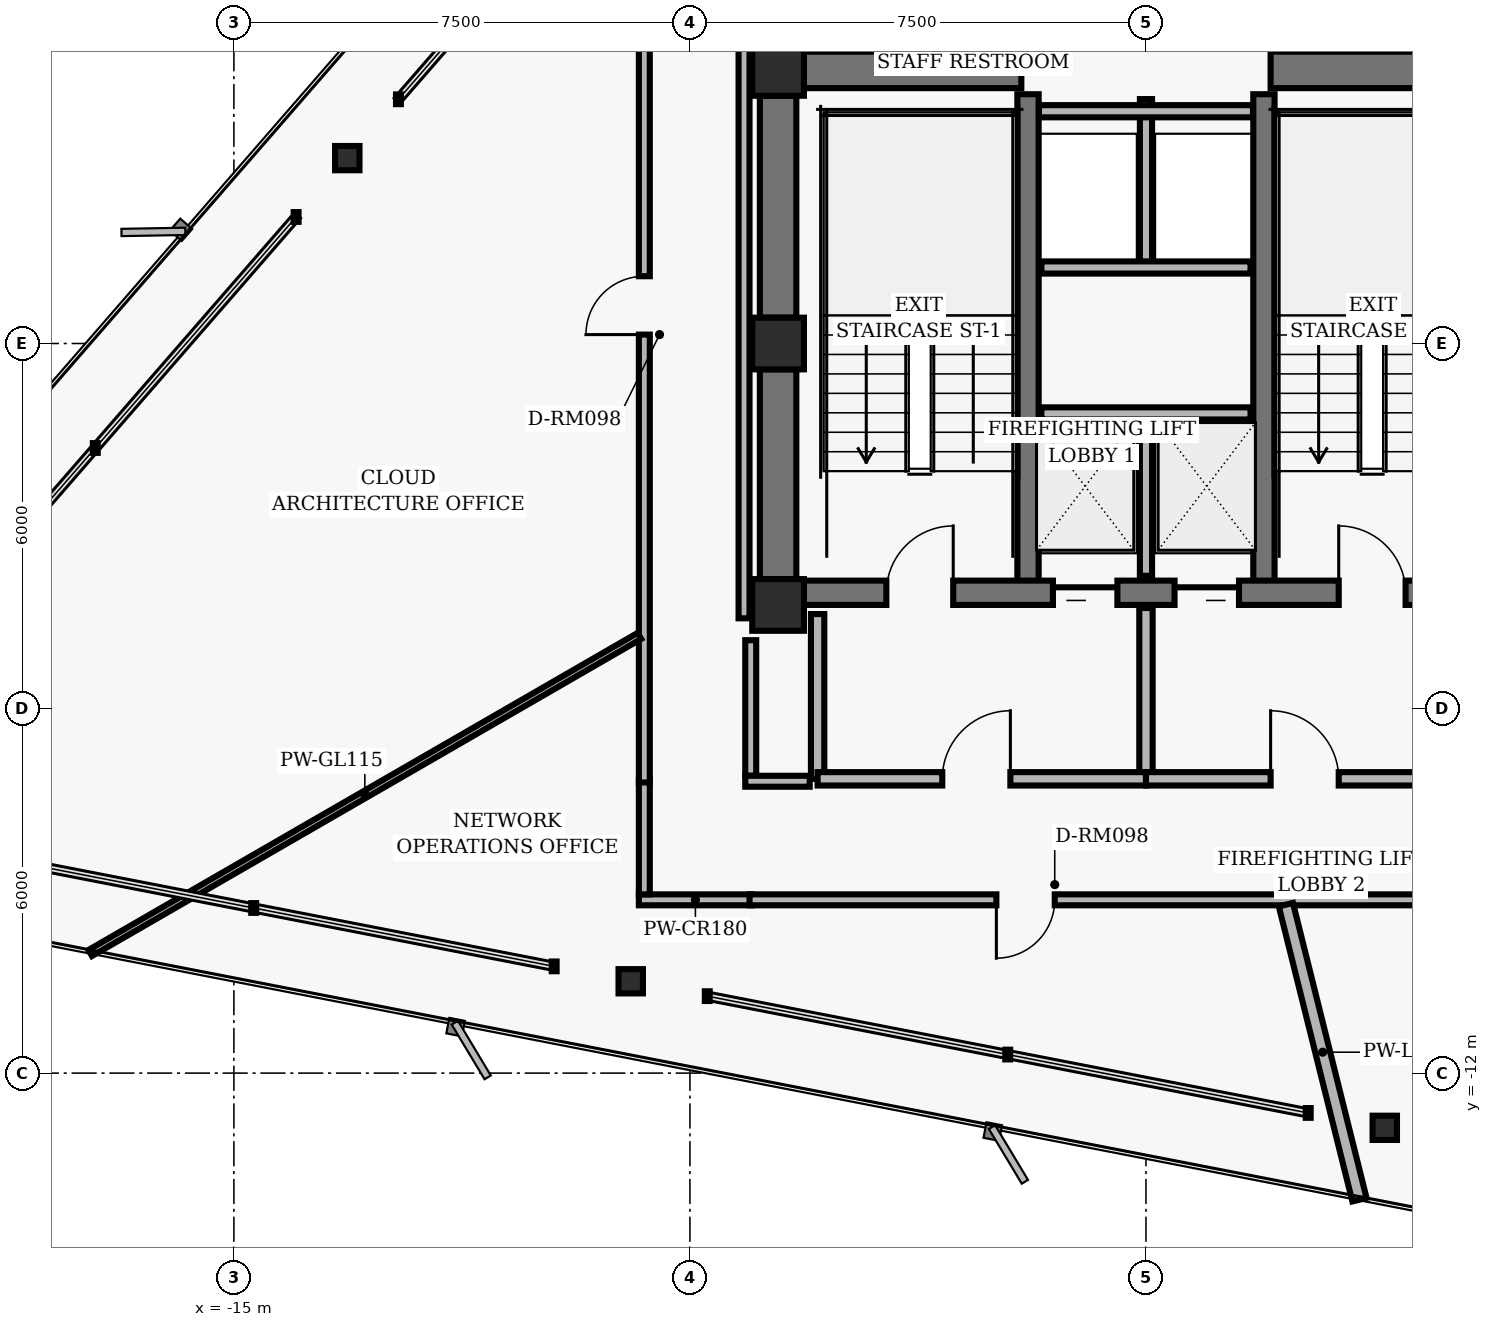
"""IFC4 building model, lengths in metres.
Left out: names, types, materials, properties, quantities, classifications, styles, units other than length and angle.
Written with IfcOpenShell. Run it as: python <this file> out.ifc"""

import sys

from ifc_helpers import new_model, si_unit, direction, frame, frame_2d, origin, origin_2d, place, context, subcontext, project, spatial, rectangle, hollow_rectangle, i_section, extrude, element, fill, save


model = new_model("IFC4")
c1 = context("Model", 3, precision=1e-05, world=origin(), true_north=direction((0.0, 1.0)))
c2 = subcontext(c1, "Body", "Model", "MODEL_VIEW")
j1 = project(units=[si_unit("LENGTHUNIT", "METRE"), si_unit("PLANEANGLEUNIT", "RADIAN")], contexts=[c1])
p1 = place(None, origin())
s1 = spatial("IfcSite", under=j1, at=p1, CompositionType="ELEMENT")
p2 = place(p1, origin())
s2 = spatial("IfcBuilding", under=s1, at=p2, CompositionType="ELEMENT")
p3 = place(p2, frame((0.0, 0.0, 150.24)))
s3 = spatial("IfcBuildingStorey", under=s2, at=p3, CompositionType="ELEMENT", Elevation=150.24)
for number, where, z_axis, x_axis in (
    (1, (-6.05, 4.5, 0.0), (0.0, 0.0, 1.0), (1.0, 0.0, 0.0)),
    (2, (-6.05, 0.0, 0.0), (0.0, 0.0, 1.0), (1.0, 0.0, 0.0)),
    (3, (-6.05, -4.3, 0.0), (0.0, 0.0, 1.0), (1.0, 0.0, 0.0)),
):
    element("IfcColumn", number, at=place(p3, frame(where, z_axis=z_axis, x_axis=x_axis)), inside=s3, PredefinedType="COLUMN", context=c2, shape_type="SweptSolid", body=[
        extrude(hollow_rectangle(XDim=0.85, YDim=0.85, WallThickness=0.055, InnerFilletRadius=0.02, OuterFilletRadius=0.04, at=origin_2d()), origin(), (0.0, 0.0, 1.0), 3.04),
    ])
p4 = place(p3, frame((-6.05, 0.425, 0.0), z_axis=(0.0, 0.0, 1.0), x_axis=(0.0, 1.0, 0.0)))
e4 = element("IfcWall", 4, at=p4, inside=s3, PredefinedType="SHEAR", context=c2, shape_type="SweptSolid", body=[
    extrude(rectangle(XDim=3.65, YDim=0.6, at=frame_2d((1.825, 0.0))), origin(), (0.0, 0.0, 1.0), 2.788),
])
p5 = place(p3, frame((-6.05, -3.875, 0.0), z_axis=(0.0, 0.0, 1.0), x_axis=(0.0, 1.0, 0.0)))
e5 = element("IfcWall", 5, at=p5, inside=s3, PredefinedType="SHEAR", context=c2, shape_type="SweptSolid", body=[
    extrude(rectangle(XDim=3.45, YDim=0.6, at=frame_2d((1.725, 0.0))), origin(), (0.0, 0.0, 1.0), 2.788),
])
for number, where, z_axis, x_axis in (
    (6, (-1.94, -4.1, 0.0), (0.0, 0.0, 1.0), (0.0, 1.0, 0.0)),
    (7, (1.94, -4.1, 0.0), (0.0, 0.0, 1.0), (0.0, 1.0, 0.0)),
):
    element("IfcWall", number, at=place(p3, frame(where, z_axis=z_axis, x_axis=x_axis)), inside=s3, PredefinedType="SHEAR", context=c2, shape_type="SweptSolid", body=[
        extrude(rectangle(XDim=8.2, YDim=0.35, at=frame_2d((4.1, 0.0))), origin(), (0.0, 0.0, 1.0), 2.788),
    ])
p6 = place(p3, frame((-5.625, -4.1, 0.0), z_axis=(0.0, 0.0, 1.0), x_axis=(1.0, 0.0, 0.0)))
e8 = element("IfcWall", 8, at=p6, inside=s3, PredefinedType="SHEAR", context=c2, shape_type="SweptSolid", body=[
    extrude(rectangle(XDim=11.25, YDim=0.4, at=frame_2d((5.625, 0.0))), origin(), (0.0, 0.0, 1.0), 2.788),
])
p7 = place(p6, frame((1.355, 0.0, 0.0)))
e9 = element("IfcOpeningElement", 9, at=p7, cuts=e8, PredefinedType="OPENING", context=c2, shape_type="SweptSolid", body=[
    extrude(rectangle(XDim=1.1, YDim=2.04, at=frame_2d((0.55, 1.02))), frame((0.0, 0.21, 0.0), z_axis=(0.0, -1.0, 0.0), x_axis=(1.0, 0.0, 0.0)), (0.0, 0.0, 1.0), 0.42),
])
p8 = place(p6, frame((8.795, 0.0, 0.0)))
e10 = element("IfcOpeningElement", 10, at=p8, cuts=e8, PredefinedType="OPENING", context=c2, shape_type="SweptSolid", body=[
    extrude(rectangle(XDim=1.1, YDim=2.04, at=frame_2d((0.55, 1.02))), frame((0.0, 0.21, 0.0), z_axis=(0.0, -1.0, 0.0), x_axis=(1.0, 0.0, 0.0)), (0.0, 0.0, 1.0), 0.42),
])
p9 = place(p6, frame((4.095, 0.0, 0.0)))
e11 = element("IfcOpeningElement", 11, at=p9, cuts=e8, PredefinedType="OPENING", context=c2, shape_type="SweptSolid", body=[
    extrude(rectangle(XDim=1.06, YDim=2.04, at=frame_2d((0.53, 1.02))), frame((0.0, 0.21, 0.0), z_axis=(0.0, -1.0, 0.0), x_axis=(1.0, 0.0, 0.0)), (0.0, 0.0, 1.0), 0.42),
])
p10 = place(p6, frame((6.095, 0.0, 0.0)))
e12 = element("IfcOpeningElement", 12, at=p10, cuts=e8, PredefinedType="OPENING", context=c2, shape_type="SweptSolid", body=[
    extrude(rectangle(XDim=1.06, YDim=2.04, at=frame_2d((0.53, 1.02))), frame((0.0, 0.21, 0.0), z_axis=(0.0, -1.0, 0.0), x_axis=(1.0, 0.0, 0.0)), (0.0, 0.0, 1.0), 0.42),
])
for number, where, z_axis, x_axis in (
    (13, (-5.625, 4.5, 0.0), (0.0, 0.0, 1.0), (1.0, 0.0, 0.0)),
    (14, (2.05, 4.5, 0.0), (0.0, 0.0, 1.0), (1.0, 0.0, 0.0)),
):
    element("IfcWall", number, at=place(p3, frame(where, z_axis=z_axis, x_axis=x_axis)), inside=s3, PredefinedType="SHEAR", context=c2, shape_type="SweptSolid", body=[
        extrude(rectangle(XDim=3.575, YDim=0.6, at=frame_2d((1.788, 0.0))), origin(), (0.0, 0.0, 1.0), 2.788),
    ])
for number, where, z_axis, x_axis in (
    (15, (-13.135, 3.049, 0.0), (0.0, 0.0, 1.0), (1.0, 0.0, 0.0)),
    (16, (-8.474, -10.49, 0.0), (0.0, 0.0, 1.0), (1.0, 0.0, 0.0)),
    (17, (3.927, -12.9, 0.0), (0.0, 0.0, 1.0), (1.0, 0.0, 0.0)),
):
    element("IfcColumn", number, at=place(p3, frame(where, z_axis=z_axis, x_axis=x_axis)), inside=s3, PredefinedType="COLUMN", context=c2, shape_type="SweptSolid", body=[
        extrude(i_section(OverallWidth=0.401, OverallDepth=0.399, WebThickness=0.025, FlangeThickness=0.04, FilletRadius=0.018, at=origin_2d()), origin(), (0.0, 0.0, 1.0), 3.04),
    ])
p11 = place(p3, frame((0.0, -3.82, 0.0), z_axis=(0.0, 0.0, 1.0), x_axis=(0.0, 1.0, 0.0)))
e18 = element("IfcWall", 18, at=p11, inside=s3, PredefinedType="PARTITIONING", context=c2, shape_type="SweptSolid", body=[
    extrude(rectangle(XDim=2.67, YDim=0.2, at=frame_2d((1.335, 0.0))), origin(), (0.0, 0.0, 1.0), 2.763),
])
p12 = place(p3, frame((-1.72, -1.15, 0.0), z_axis=(0.0, 0.0, 1.0), x_axis=(1.0, 0.0, 0.0)))
e19 = element("IfcWall", 19, at=p12, inside=s3, PredefinedType="PARTITIONING", context=c2, shape_type="SweptSolid", body=[
    extrude(rectangle(XDim=3.44, YDim=0.2, at=frame_2d((1.72, 0.0))), origin(), (0.0, 0.0, 1.0), 2.763),
])
p13 = place(p3, frame((-5.4, -7.16, 0.0), z_axis=(0.0, 0.0, 1.0), x_axis=(0.0, 1.0, 0.0)))
e20 = element("IfcWall", 20, at=p13, inside=s3, PredefinedType="PARTITIONING", context=c2, shape_type="SweptSolid", body=[
    extrude(rectangle(XDim=2.71, YDim=0.22, at=frame_2d((1.355, 0.0))), origin(), (0.0, 0.0, 1.0), 2.763),
])
p14 = place(p3, frame((0.0, -7.16, 0.0), z_axis=(0.0, 0.0, 1.0), x_axis=(0.0, 1.0, 0.0)))
e21 = element("IfcWall", 21, at=p14, inside=s3, PredefinedType="PARTITIONING", context=c2, shape_type="SweptSolid", body=[
    extrude(rectangle(XDim=2.81, YDim=0.22, at=frame_2d((1.405, 0.0))), origin(), (0.0, 0.0, 1.0), 2.763),
])
p15 = place(p3, frame((-5.4, -7.16, 0.0), z_axis=(0.0, 0.0, 1.0), x_axis=(1.0, 0.0, 0.0)))
e22 = element("IfcWall", 22, at=p15, inside=s3, PredefinedType="PARTITIONING", context=c2, shape_type="SweptSolid", body=[
    extrude(rectangle(XDim=5.4, YDim=0.22, at=frame_2d((2.7, 0.0))), origin(), (0.0, 0.0, 1.0), 2.33),
])
p16 = place(p15, frame((2.05, 0.0, 0.0)))
e23 = element("IfcOpeningElement", 23, at=p16, cuts=e22, PredefinedType="OPENING", context=c2, shape_type="SweptSolid", body=[
    extrude(rectangle(XDim=1.12, YDim=2.02, at=frame_2d((0.56, 1.01))), frame((0.0, 0.12, 0.0), z_axis=(0.0, -1.0, 0.0), x_axis=(1.0, 0.0, 0.0)), (0.0, 0.0, 1.0), 0.24),
])
p17 = place(p3, frame((0.0, -7.16, 0.0), z_axis=(0.0, 0.0, 1.0), x_axis=(1.0, 0.0, 0.0)))
e24 = element("IfcWall", 24, at=p17, inside=s3, PredefinedType="PARTITIONING", context=c2, shape_type="SweptSolid", body=[
    extrude(rectangle(XDim=5.4, YDim=0.22, at=frame_2d((2.7, 0.0))), origin(), (0.0, 0.0, 1.0), 2.33),
])
p18 = place(p17, frame((2.05, 0.0, 0.0)))
e25 = element("IfcOpeningElement", 25, at=p18, cuts=e24, PredefinedType="OPENING", context=c2, shape_type="SweptSolid", body=[
    extrude(rectangle(XDim=1.12, YDim=2.02, at=frame_2d((0.56, 1.01))), frame((0.0, 0.12, 0.0), z_axis=(0.0, -1.0, 0.0), x_axis=(1.0, 0.0, 0.0)), (0.0, 0.0, 1.0), 0.24),
])
p19 = place(p3, frame((0.0, 1.25, 0.0), z_axis=(0.0, 0.0, 1.0), x_axis=(0.0, 1.0, 0.0)))
e26 = element("IfcWall", 26, at=p19, inside=s3, PredefinedType="PARTITIONING", context=c2, shape_type="SweptSolid", body=[
    extrude(rectangle(XDim=2.77, YDim=0.2, at=frame_2d((1.385, 0.0))), origin(), (0.0, 0.0, 1.0), 2.763),
])
p20 = place(p3, frame((-1.72, 1.25, 0.0), z_axis=(0.0, 0.0, 1.0), x_axis=(1.0, 0.0, 0.0)))
e27 = element("IfcWall", 27, at=p20, inside=s3, PredefinedType="PARTITIONING", context=c2, shape_type="SweptSolid", body=[
    extrude(rectangle(XDim=3.44, YDim=0.2, at=frame_2d((1.72, 0.0))), origin(), (0.0, 0.0, 1.0), 2.763),
])
p21 = place(p3, frame((-1.76, 3.82, 0.0), z_axis=(0.0, 0.0, 1.0), x_axis=(1.0, 0.0, 0.0)))
e28 = element("IfcWall", 28, at=p21, inside=s3, PredefinedType="PARTITIONING", context=c2, shape_type="SweptSolid", body=[
    extrude(rectangle(XDim=3.52, YDim=0.2, at=frame_2d((1.76, 0.0))), origin(), (0.0, 0.0, 1.0), 2.763),
])
p22 = place(p3, frame((-6.48, -9.15, 0.0), z_axis=(0.0, 0.0, 1.0), x_axis=(-1.0, 0.0, 0.0)))
e29 = element("IfcWall", 29, at=p22, inside=s3, PredefinedType="PARTITIONING", context=c2, shape_type="SweptSolid", body=[
    extrude(rectangle(XDim=1.86, YDim=0.18, at=frame_2d((0.93, 0.0))), origin(), (0.0, 0.0, 1.0), 2.33),
])
p23 = place(p3, frame((-8.25, -9.06, 0.0), z_axis=(0.0, 0.0, 1.0), x_axis=(0.0, 1.0, 0.0)))
e30 = element("IfcWall", 30, at=p23, inside=s3, PredefinedType="PARTITIONING", context=c2, shape_type="SweptSolid", body=[
    extrude(rectangle(XDim=1.88, YDim=0.18, at=frame_2d((0.94, 0.0))), origin(), (0.0, 0.0, 1.0), 2.763),
])
p24 = place(p3, frame((-8.25, -7.22, 0.0), z_axis=(0.0, 0.0, 1.0), x_axis=(0.0, 1.0, 0.0)))
e31 = element("IfcWall", 31, at=p24, inside=s3, PredefinedType="PARTITIONING", context=c2, shape_type="SweptSolid", body=[
    extrude(rectangle(XDim=14.44, YDim=0.18, at=frame_2d((7.22, 0.0))), origin(), (0.0, 0.0, 1.0), 2.763),
])
p25 = place(p24, frame((7.366, 0.0, 0.0)))
e32 = element("IfcOpeningElement", 32, at=p25, cuts=e31, PredefinedType="OPENING", context=c2, shape_type="SweptSolid", body=[
    extrude(rectangle(XDim=0.96, YDim=2.02, at=frame_2d((0.48, 1.01))), frame((0.0, 0.1, 0.0), z_axis=(0.0, -1.0, 0.0), x_axis=(1.0, 0.0, 0.0)), (0.0, 0.0, 1.0), 0.2),
])
p26 = place(p3, frame((-6.61, 4.94, 0.0), z_axis=(0.0, 0.0, 1.0), x_axis=(0.0, -1.0, 0.0)))
e33 = element("IfcWall", 33, at=p26, inside=s3, PredefinedType="PARTITIONING", context=c2, shape_type="SweptSolid", body=[
    extrude(rectangle(XDim=9.46, YDim=0.18, at=frame_2d((4.73, 0.0))), origin(), (0.0, 0.0, 1.0), 2.763),
])
p27 = place(p3, frame((-6.5, -4.88, 0.0), z_axis=(0.0, 0.0, 1.0), x_axis=(0.0, -1.0, 0.0)))
e34 = element("IfcWall", 34, at=p27, inside=s3, PredefinedType="PARTITIONING", context=c2, shape_type="SweptSolid", body=[
    extrude(rectangle(XDim=2.23, YDim=0.18, at=frame_2d((1.115, 0.0))), origin(), (0.0, 0.0, 1.0), 2.763),
])
p28 = place(p3, frame((-6.59, -7.2, 0.0), z_axis=(0.0, 0.0, 1.0), x_axis=(1.0, 0.0, 0.0)))
e35 = element("IfcWall", 35, at=p28, inside=s3, PredefinedType="PARTITIONING", context=c2, shape_type="SweptSolid", body=[
    extrude(rectangle(XDim=1.06, YDim=0.18, at=frame_2d((0.53, 0.0))), origin(), (0.0, 0.0, 1.0), 2.763),
])
p29 = place(p3, frame((10.98, -9.15, 0.0), z_axis=(0.0, 0.0, 1.0), x_axis=(-1.0, 0.0, 0.0)))
e36 = element("IfcWall", 36, at=p29, inside=s3, PredefinedType="PARTITIONING", context=c2, shape_type="SweptSolid", body=[
    extrude(rectangle(XDim=17.5, YDim=0.18, at=frame_2d((8.75, 0.0))), origin(), (0.0, 0.0, 1.0), 2.33),
])
p30 = place(p29, frame((12.48, 0.0, 0.0)))
e37 = element("IfcOpeningElement", 37, at=p30, cuts=e36, PredefinedType="OPENING", context=c2, shape_type="SweptSolid", body=[
    extrude(rectangle(XDim=0.96, YDim=2.02, at=frame_2d((0.48, 1.01))), frame((0.0, 0.1, 0.0), z_axis=(0.0, -1.0, 0.0), x_axis=(1.0, 0.0, 0.0)), (0.0, 0.0, 1.0), 0.2),
])
p31 = place(p29, frame((3.988, 0.0, 0.0)))
e38 = element("IfcOpeningElement", 38, at=p31, cuts=e36, PredefinedType="OPENING", context=c2, shape_type="SweptSolid", body=[
    extrude(rectangle(XDim=0.96, YDim=2.02, at=frame_2d((0.48, 1.01))), frame((0.0, 0.1, 0.0), z_axis=(0.0, -1.0, 0.0), x_axis=(1.0, 0.0, 0.0)), (0.0, 0.0, 1.0), 0.2),
])
p32 = place(p3, frame((-8.33, -4.809, 0.0), z_axis=(0.0, 0.0, 1.0), x_axis=(-0.866024997974, -0.500000702884, 0.0)))
e39 = element("IfcWall", 39, at=p32, inside=s3, PredefinedType="MOVABLE", context=c2, shape_type="SweptSolid", body=[
    extrude(rectangle(XDim=10.431, YDim=0.115, at=frame_2d((5.215, 0.0))), origin(), (0.0, 0.0, 1.0), 2.132),
])
p33 = place(p3, frame((2.301, -9.23, 0.0), z_axis=(0.0, 0.0, 1.0), x_axis=(0.241903783585, -0.970300241929, 0.0)))
e40 = element("IfcWall", 40, at=p33, inside=s3, PredefinedType="PARTITIONING", context=c2, shape_type="SweptSolid", body=[
    extrude(rectangle(XDim=5.001, YDim=0.24, at=frame_2d((2.5, 0.0))), origin(), (0.0, 0.0, 1.0), 2.763),
])
p34 = place(p7, origin())
e41 = element("IfcDoor", 41, at=p34, inside=s3, OperationType="SINGLE_SWING_RIGHT", PredefinedType="DOOR", context=c2, shape_type="SweptSolid", body=[
    extrude(rectangle(XDim=1.1, YDim=2.04, at=frame_2d((0.55, 1.02))), frame((0.0, 0.025, 0.0), z_axis=(0.0, -1.0, 0.0), x_axis=(1.0, 0.0, 0.0)), (0.0, 0.0, 1.0), 0.05),
])
fill(e9, e41)
p35 = place(p8, origin())
e42 = element("IfcDoor", 42, at=p35, inside=s3, OperationType="SINGLE_SWING_LEFT", PredefinedType="DOOR", context=c2, shape_type="SweptSolid", body=[
    extrude(rectangle(XDim=1.1, YDim=2.04, at=frame_2d((0.55, 1.02))), frame((0.0, 0.025, 0.0), z_axis=(0.0, -1.0, 0.0), x_axis=(1.0, 0.0, 0.0)), (0.0, 0.0, 1.0), 0.05),
])
fill(e10, e42)
p36 = place(p9, origin())
e43 = element("IfcDoor", 43, at=p36, inside=s3, OperationType="SLIDING_TO_LEFT", PredefinedType="DOOR", context=c2, shape_type="SweptSolid", body=[
    extrude(rectangle(XDim=1.06, YDim=2.04, at=frame_2d((0.53, 1.02))), frame((0.0, 0.025, 0.0), z_axis=(0.0, -1.0, 0.0), x_axis=(1.0, 0.0, 0.0)), (0.0, 0.0, 1.0), 0.05),
])
fill(e11, e43)
p37 = place(p10, origin())
e44 = element("IfcDoor", 44, at=p37, inside=s3, OperationType="SLIDING_TO_RIGHT", PredefinedType="DOOR", context=c2, shape_type="SweptSolid", body=[
    extrude(rectangle(XDim=1.06, YDim=2.04, at=frame_2d((0.53, 1.02))), frame((0.0, 0.025, 0.0), z_axis=(0.0, -1.0, 0.0), x_axis=(1.0, 0.0, 0.0)), (0.0, 0.0, 1.0), 0.05),
])
fill(e12, e44)
p38 = place(p16, origin())
e45 = element("IfcDoor", 45, at=p38, inside=s3, OperationType="SINGLE_SWING_RIGHT", PredefinedType="DOOR", context=c2, shape_type="SweptSolid", body=[
    extrude(rectangle(XDim=1.12, YDim=2.02, at=frame_2d((0.56, 1.01))), frame((0.0, 0.025, 0.0), z_axis=(0.0, -1.0, 0.0), x_axis=(1.0, 0.0, 0.0)), (0.0, 0.0, 1.0), 0.05),
])
fill(e23, e45)
p39 = place(p18, origin())
e46 = element("IfcDoor", 46, at=p39, inside=s3, OperationType="SINGLE_SWING_LEFT", PredefinedType="DOOR", context=c2, shape_type="SweptSolid", body=[
    extrude(rectangle(XDim=1.12, YDim=2.02, at=frame_2d((0.56, 1.01))), frame((0.0, 0.025, 0.0), z_axis=(0.0, -1.0, 0.0), x_axis=(1.0, 0.0, 0.0)), (0.0, 0.0, 1.0), 0.05),
])
fill(e25, e46)
p40 = place(p25, origin())
e47 = element("IfcDoor", 47, at=p40, inside=s3, OperationType="SINGLE_SWING_LEFT", PredefinedType="DOOR", context=c2, shape_type="SweptSolid", body=[
    extrude(rectangle(XDim=0.96, YDim=2.02, at=frame_2d((0.48, 1.01))), frame((0.0, 0.025, 0.0), z_axis=(0.0, -1.0, 0.0), x_axis=(1.0, 0.0, 0.0)), (0.0, 0.0, 1.0), 0.05),
])
fill(e32, e47)
p41 = place(p30, origin())
e48 = element("IfcDoor", 48, at=p41, inside=s3, OperationType="SINGLE_SWING_RIGHT", PredefinedType="DOOR", context=c2, shape_type="SweptSolid", body=[
    extrude(rectangle(XDim=0.96, YDim=2.02, at=frame_2d((0.48, 1.01))), frame((0.0, 0.025, 0.0), z_axis=(0.0, -1.0, 0.0), x_axis=(1.0, 0.0, 0.0)), (0.0, 0.0, 1.0), 0.05),
])
fill(e37, e48)
save(model, sys.argv[1])
